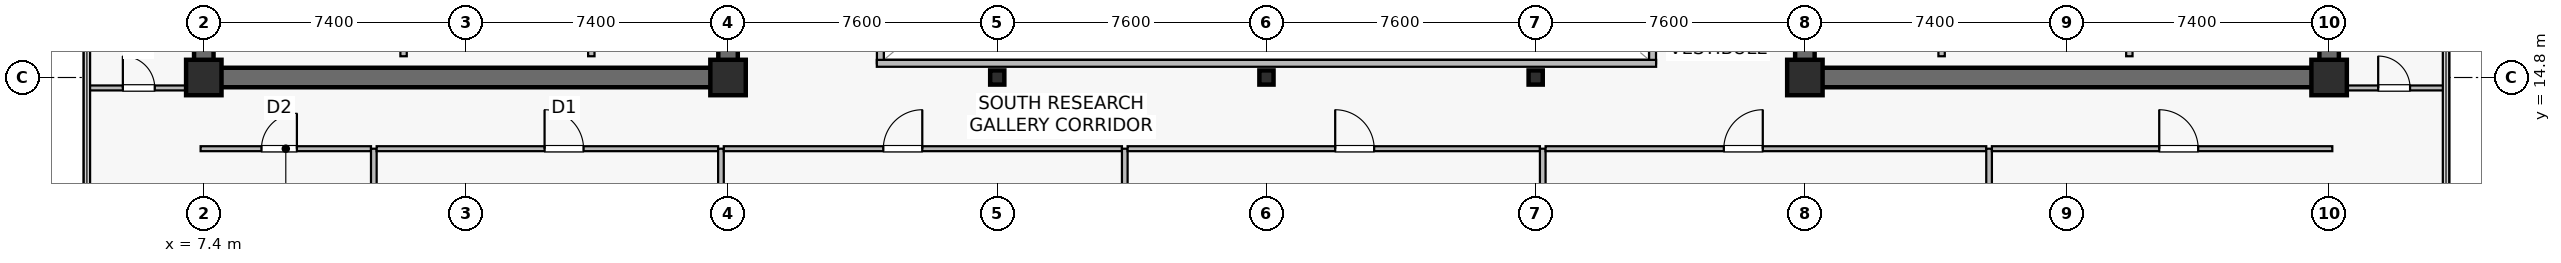
"""IFC4 building model, lengths in metres.
Left out: names, types, materials, properties, quantities, classifications, styles, units other than length and angle.
Written with IfcOpenShell. Run it as: python <this file> out.ifc"""

import sys

from ifc_helpers import new_model, si_unit, direction, frame, frame_2d, origin, origin_2d, place, context, subcontext, project, spatial, rectangle, hollow_rectangle, extrude, source, transform, mapped, element, fill, save


model = new_model("IFC4")
c1 = context("Model", 3, precision=1e-05, world=origin(), true_north=direction((0.0, 1.0)))
c2 = subcontext(c1, "Body", "Model", "MODEL_VIEW")
j1 = project(units=[si_unit("LENGTHUNIT", "METRE"), si_unit("PLANEANGLEUNIT", "RADIAN")], contexts=[c1])
p1 = place(None, origin())
s1 = spatial("IfcSite", under=j1, at=p1, CompositionType="ELEMENT")
p2 = place(p1, origin())
s2 = spatial("IfcBuilding", under=s1, at=p2, CompositionType="ELEMENT")
p3 = place(p2, frame((0.0, 0.0, 205.5)))
s3 = spatial("IfcBuildingStorey", under=s2, at=p3, CompositionType="ELEMENT", Elevation=205.5)
p4 = place(p3, frame((7.125, 14.8, 0.0), z_axis=(0.0, 0.0, 1.0), x_axis=(1.0, 0.0, 0.0)))
e1 = element("IfcWall", 1, at=p4, inside=s3, PredefinedType="SHEAR", context=c2, shape_type="SweptSolid", body=[
    extrude(rectangle(XDim=15.35, YDim=0.55, at=frame_2d((7.675, 0.0))), origin(), (0.0, 0.0, 1.0), 3.8),
])
p5 = place(p3, frame((7.4, 15.075, 0.0), z_axis=(0.0, 0.0, 1.0), x_axis=(0.0, 1.0, 0.0)))
e2 = element("IfcWall", 2, at=p5, inside=s3, PredefinedType="SHEAR", context=c2, shape_type="SweptSolid", body=[
    extrude(rectangle(XDim=18.45, YDim=0.55, at=frame_2d((9.225, 0.0))), origin(), (0.0, 0.0, 1.0), 3.8),
])
p6 = place(p3, frame((22.2, 15.075, 0.0), z_axis=(0.0, 0.0, 1.0), x_axis=(0.0, 1.0, 0.0)))
e3 = element("IfcWall", 3, at=p6, inside=s3, PredefinedType="SHEAR", context=c2, shape_type="SweptSolid", body=[
    extrude(rectangle(XDim=18.45, YDim=0.55, at=frame_2d((9.225, 0.0))), origin(), (0.0, 0.0, 1.0), 3.8),
])
p7 = place(p6, frame((3.475, 0.0, 0.0)))
e4 = element("IfcOpeningElement", 4, at=p7, cuts=e3, PredefinedType="OPENING", context=c2, shape_type="SweptSolid", body=[
    extrude(rectangle(XDim=1.42, YDim=2.2, at=frame_2d((0.71, 1.1))), frame((0.0, 0.285, 0.0), z_axis=(0.0, -1.0, 0.0), x_axis=(1.0, 0.0, 0.0)), (0.0, 0.0, 1.0), 0.57),
])
p8 = place(p3, frame((52.325, 14.8, 0.0), z_axis=(0.0, 0.0, 1.0), x_axis=(1.0, 0.0, 0.0)))
e5 = element("IfcWall", 5, at=p8, inside=s3, PredefinedType="SHEAR", context=c2, shape_type="SweptSolid", body=[
    extrude(rectangle(XDim=15.35, YDim=0.55, at=frame_2d((7.675, 0.0))), origin(), (0.0, 0.0, 1.0), 3.8),
])
p9 = place(p3, frame((52.6, 15.075, 0.0), z_axis=(0.0, 0.0, 1.0), x_axis=(0.0, 1.0, 0.0)))
e6 = element("IfcWall", 6, at=p9, inside=s3, PredefinedType="SHEAR", context=c2, shape_type="SweptSolid", body=[
    extrude(rectangle(XDim=18.45, YDim=0.55, at=frame_2d((9.225, 0.0))), origin(), (0.0, 0.0, 1.0), 3.8),
])
p10 = place(p9, frame((3.475, 0.0, 0.0)))
e7 = element("IfcOpeningElement", 7, at=p10, cuts=e6, PredefinedType="OPENING", context=c2, shape_type="SweptSolid", body=[
    extrude(rectangle(XDim=1.42, YDim=2.2, at=frame_2d((0.71, 1.1))), frame((0.0, 0.285, 0.0), z_axis=(0.0, -1.0, 0.0), x_axis=(1.0, 0.0, 0.0)), (0.0, 0.0, 1.0), 0.57),
])
p11 = place(p3, frame((67.4, 15.075, 0.0), z_axis=(0.0, 0.0, 1.0), x_axis=(0.0, 1.0, 0.0)))
e8 = element("IfcWall", 8, at=p11, inside=s3, PredefinedType="SHEAR", context=c2, shape_type="SweptSolid", body=[
    extrude(rectangle(XDim=18.45, YDim=0.55, at=frame_2d((9.225, 0.0))), origin(), (0.0, 0.0, 1.0), 3.8),
])
m1 = source(origin(), c2, "Body", "SweptSolid", [
    extrude(rectangle(XDim=1.0, YDim=1.0, at=origin_2d()), origin(), (0.0, 0.0, 1.0), 4.1),
])
for number, where, z_axis, x_axis in (
    (9, (7.4, 14.8, 0.0), (0.0, 0.0, 1.0), (1.0, 0.0, 0.0)),
    (10, (22.2, 14.8, 0.0), (0.0, 0.0, 1.0), (1.0, 0.0, 0.0)),
    (11, (52.6, 14.8, 0.0), (0.0, 0.0, 1.0), (1.0, 0.0, 0.0)),
    (12, (67.4, 14.8, 0.0), (0.0, 0.0, 1.0), (1.0, 0.0, 0.0)),
):
    element("IfcColumn", number, at=place(p3, frame(where, z_axis=z_axis, x_axis=x_axis)), inside=s3, PredefinedType="COLUMN", context=c2, shape_type="MappedRepresentation", body=[
        mapped(m1, transform((0.0, 0.0, 0.0), scale=1.0)),
    ])
m2 = source(origin(), c2, "Body", "SweptSolid", [
    extrude(hollow_rectangle(XDim=0.4, YDim=0.4, WallThickness=0.019, at=origin_2d()), origin(), (0.0, 0.0, 1.0), 4.1),
])
for number, where, z_axis, x_axis in (
    (13, (29.8, 14.8, 0.0), (0.0, 0.0, 1.0), (1.0, 0.0, 0.0)),
    (14, (37.4, 14.8, 0.0), (0.0, 0.0, 1.0), (1.0, 0.0, 0.0)),
    (15, (45.0, 14.8, 0.0), (0.0, 0.0, 1.0), (1.0, 0.0, 0.0)),
):
    element("IfcColumn", number, at=place(p3, frame(where, z_axis=z_axis, x_axis=x_axis)), inside=s3, PredefinedType="COLUMN", context=c2, shape_type="MappedRepresentation", body=[
        mapped(m2, transform((0.0, 0.0, 0.0), scale=1.0)),
    ])
for number, where, z_axis, x_axis in (
    (16, (13.04, 15.4, 0.0), (0.0, 0.0, 1.0), (0.0, 1.0, 0.0)),
    (17, (18.34, 15.4, 0.0), (0.0, 0.0, 1.0), (0.0, 1.0, 0.0)),
    (18, (61.76, 15.4, 0.0), (0.0, 0.0, 1.0), (0.0, 1.0, 0.0)),
    (19, (56.46, 15.4, 0.0), (0.0, 0.0, 1.0), (0.0, 1.0, 0.0)),
):
    element("IfcWall", number, at=place(p3, frame(where, z_axis=z_axis, x_axis=x_axis)), inside=s3, PredefinedType="SOLIDWALL", context=c2, shape_type="SweptSolid", body=[
        extrude(rectangle(XDim=2.4, YDim=0.18, at=frame_2d((1.2, 0.0))), origin(), (0.0, 0.0, 1.0), 3.8),
    ])
p12 = place(p3, frame((26.5, 15.2, 0.0), z_axis=(0.0, 0.0, 1.0), x_axis=(0.0, 1.0, 0.0)))
e20 = element("IfcWall", 20, at=p12, inside=s3, PredefinedType="SOLIDWALL", context=c2, shape_type="SweptSolid", body=[
    extrude(rectangle(XDim=18.2, YDim=0.195, at=frame_2d((9.1, 0.0))), origin(), (0.0, 0.0, 1.0), 3.8),
])
p13 = place(p12, frame((1.8, 0.0, 0.9)))
e21 = element("IfcOpeningElement", 21, at=p13, cuts=e20, PredefinedType="OPENING", context=c2, shape_type="SweptSolid", body=[
    extrude(rectangle(XDim=1.2, YDim=1.35, at=frame_2d((0.6, 0.675))), frame((0.0, 0.107, 0.0), z_axis=(0.0, -1.0, 0.0), x_axis=(1.0, 0.0, 0.0)), (0.0, 0.0, 1.0), 0.215),
])
p14 = place(p12, frame((13.2, 0.0, 0.9)))
e22 = element("IfcOpeningElement", 22, at=p14, cuts=e20, PredefinedType="OPENING", context=c2, shape_type="SweptSolid", body=[
    extrude(rectangle(XDim=1.2, YDim=1.35, at=frame_2d((0.6, 0.675))), frame((0.0, 0.107, 0.0), z_axis=(0.0, -1.0, 0.0), x_axis=(1.0, 0.0, 0.0)), (0.0, 0.0, 1.0), 0.215),
])
p15 = place(p3, frame((48.3, 15.2, 0.0), z_axis=(0.0, 0.0, 1.0), x_axis=(0.0, 1.0, 0.0)))
e23 = element("IfcWall", 23, at=p15, inside=s3, PredefinedType="SOLIDWALL", context=c2, shape_type="SweptSolid", body=[
    extrude(rectangle(XDim=18.2, YDim=0.195, at=frame_2d((9.1, 0.0))), origin(), (0.0, 0.0, 1.0), 3.8),
])
p16 = place(p15, frame((1.8, 0.0, 0.9)))
e24 = element("IfcOpeningElement", 24, at=p16, cuts=e23, PredefinedType="OPENING", context=c2, shape_type="SweptSolid", body=[
    extrude(rectangle(XDim=1.2, YDim=1.35, at=frame_2d((0.6, 0.675))), frame((0.0, 0.107, 0.0), z_axis=(0.0, -1.0, 0.0), x_axis=(1.0, 0.0, 0.0)), (0.0, 0.0, 1.0), 0.215),
])
p17 = place(p15, frame((13.2, 0.0, 0.9)))
e25 = element("IfcOpeningElement", 25, at=p17, cuts=e23, PredefinedType="OPENING", context=c2, shape_type="SweptSolid", body=[
    extrude(rectangle(XDim=1.2, YDim=1.35, at=frame_2d((0.6, 0.675))), frame((0.0, 0.107, 0.0), z_axis=(0.0, -1.0, 0.0), x_axis=(1.0, 0.0, 0.0)), (0.0, 0.0, 1.0), 0.215),
])
p18 = place(p3, frame((26.4, 15.2, 0.0), z_axis=(0.0, 0.0, 1.0), x_axis=(1.0, 0.0, 0.0)))
e26 = element("IfcWall", 26, at=p18, inside=s3, PredefinedType="SOLIDWALL", context=c2, shape_type="SweptSolid", body=[
    extrude(rectangle(XDim=22.0, YDim=0.195, at=frame_2d((11.0, 0.0))), origin(), (0.0, 0.0, 1.0), 3.8),
])
p19 = place(p3, frame((7.31, 12.79, 0.0), z_axis=(0.0, 0.0, 1.0), x_axis=(1.0, 0.0, 0.0)))
e27 = element("IfcWall", 27, at=p19, inside=s3, PredefinedType="PARTITIONING", context=c2, shape_type="SweptSolid", body=[
    extrude(rectangle(XDim=4.81, YDim=0.14, at=frame_2d((2.405, 0.0))), origin(), (0.0, 0.0, 1.0), 3.335),
])
p20 = place(p19, frame((1.719, 0.0, 0.0)))
e28 = element("IfcOpeningElement", 28, at=p20, cuts=e27, PredefinedType="OPENING", context=c2, shape_type="SweptSolid", body=[
    extrude(rectangle(XDim=1.0, YDim=2.15, at=frame_2d((0.5, 1.075))), frame((0.0, 0.08, 0.0), z_axis=(0.0, -1.0, 0.0), x_axis=(1.0, 0.0, 0.0)), (0.0, 0.0, 1.0), 0.16),
])
p21 = place(p3, frame((12.2, 2.71, 0.0), z_axis=(0.0, 0.0, 1.0), x_axis=(0.0, 1.0, 0.0)))
e29 = element("IfcWall", 29, at=p21, inside=s3, PredefinedType="PARTITIONING", context=c2, shape_type="SweptSolid", body=[
    extrude(rectangle(XDim=10.08, YDim=0.16, at=frame_2d((5.04, 0.0))), origin(), (0.0, 0.0, 1.0), 3.135),
])
p22 = place(p3, frame((12.28, 12.79, 0.0), z_axis=(0.0, 0.0, 1.0), x_axis=(1.0, 0.0, 0.0)))
e30 = element("IfcWall", 30, at=p22, inside=s3, PredefinedType="PARTITIONING", context=c2, shape_type="SweptSolid", body=[
    extrude(rectangle(XDim=9.64, YDim=0.14, at=frame_2d((4.82, 0.0))), origin(), (0.0, 0.0, 1.0), 3.197),
])
p23 = place(p22, frame((4.74, 0.0, 0.0)))
e31 = element("IfcOpeningElement", 31, at=p23, cuts=e30, PredefinedType="OPENING", context=c2, shape_type="SweptSolid", body=[
    extrude(rectangle(XDim=1.1, YDim=2.18, at=frame_2d((0.55, 1.09))), frame((0.0, 0.08, 0.0), z_axis=(0.0, -1.0, 0.0), x_axis=(1.0, 0.0, 0.0)), (0.0, 0.0, 1.0), 0.16),
])
p24 = place(p3, frame((22.0, 2.71, 0.0), z_axis=(0.0, 0.0, 1.0), x_axis=(0.0, 1.0, 0.0)))
e32 = element("IfcWall", 32, at=p24, inside=s3, PredefinedType="PARTITIONING", context=c2, shape_type="SweptSolid", body=[
    extrude(rectangle(XDim=10.08, YDim=0.16, at=frame_2d((5.04, 0.0))), origin(), (0.0, 0.0, 1.0), 3.135),
])
p25 = place(p3, frame((22.08, 12.79, 0.0), z_axis=(0.0, 0.0, 1.0), x_axis=(1.0, 0.0, 0.0)))
e33 = element("IfcWall", 33, at=p25, inside=s3, PredefinedType="PARTITIONING", context=c2, shape_type="SweptSolid", body=[
    extrude(rectangle(XDim=11.24, YDim=0.14, at=frame_2d((5.62, 0.0))), origin(), (0.0, 0.0, 1.0), 3.197),
])
p26 = place(p25, frame((4.504, 0.0, 0.0)))
e34 = element("IfcOpeningElement", 34, at=p26, cuts=e33, PredefinedType="OPENING", context=c2, shape_type="SweptSolid", body=[
    extrude(rectangle(XDim=1.1, YDim=2.18, at=frame_2d((0.55, 1.09))), frame((0.0, 0.08, 0.0), z_axis=(0.0, -1.0, 0.0), x_axis=(1.0, 0.0, 0.0)), (0.0, 0.0, 1.0), 0.16),
])
p27 = place(p3, frame((33.4, 3.91, 0.0), z_axis=(0.0, 0.0, 1.0), x_axis=(0.0, 1.0, 0.0)))
e35 = element("IfcWall", 35, at=p27, inside=s3, PredefinedType="PARTITIONING", context=c2, shape_type="SweptSolid", body=[
    extrude(rectangle(XDim=8.88, YDim=0.16, at=frame_2d((4.44, 0.0))), origin(), (0.0, 0.0, 1.0), 3.135),
])
p28 = place(p3, frame((33.48, 12.79, 0.0), z_axis=(0.0, 0.0, 1.0), x_axis=(1.0, 0.0, 0.0)))
e36 = element("IfcWall", 36, at=p28, inside=s3, PredefinedType="PARTITIONING", context=c2, shape_type="SweptSolid", body=[
    extrude(rectangle(XDim=11.64, YDim=0.14, at=frame_2d((5.82, 0.0))), origin(), (0.0, 0.0, 1.0), 3.197),
])
p29 = place(p28, frame((5.86, 0.0, 0.0)))
e37 = element("IfcOpeningElement", 37, at=p29, cuts=e36, PredefinedType="OPENING", context=c2, shape_type="SweptSolid", body=[
    extrude(rectangle(XDim=1.1, YDim=2.18, at=frame_2d((0.55, 1.09))), frame((0.0, 0.08, 0.0), z_axis=(0.0, -1.0, 0.0), x_axis=(1.0, 0.0, 0.0)), (0.0, 0.0, 1.0), 0.16),
])
p30 = place(p3, frame((45.2, 3.91, 0.0), z_axis=(0.0, 0.0, 1.0), x_axis=(0.0, 1.0, 0.0)))
e38 = element("IfcWall", 38, at=p30, inside=s3, PredefinedType="PARTITIONING", context=c2, shape_type="SweptSolid", body=[
    extrude(rectangle(XDim=8.88, YDim=0.16, at=frame_2d((4.44, 0.0))), origin(), (0.0, 0.0, 1.0), 3.135),
])
p31 = place(p3, frame((45.28, 12.79, 0.0), z_axis=(0.0, 0.0, 1.0), x_axis=(1.0, 0.0, 0.0)))
e39 = element("IfcWall", 39, at=p31, inside=s3, PredefinedType="PARTITIONING", context=c2, shape_type="SweptSolid", body=[
    extrude(rectangle(XDim=12.44, YDim=0.14, at=frame_2d((6.22, 0.0))), origin(), (0.0, 0.0, 1.0), 3.197),
])
p32 = place(p31, frame((5.031, 0.0, 0.0)))
e40 = element("IfcOpeningElement", 40, at=p32, cuts=e39, PredefinedType="OPENING", context=c2, shape_type="SweptSolid", body=[
    extrude(rectangle(XDim=1.1, YDim=2.18, at=frame_2d((0.55, 1.09))), frame((0.0, 0.08, 0.0), z_axis=(0.0, -1.0, 0.0), x_axis=(1.0, 0.0, 0.0)), (0.0, 0.0, 1.0), 0.16),
])
p33 = place(p3, frame((57.8, 2.71, 0.0), z_axis=(0.0, 0.0, 1.0), x_axis=(0.0, 1.0, 0.0)))
e41 = element("IfcWall", 41, at=p33, inside=s3, PredefinedType="PARTITIONING", context=c2, shape_type="SweptSolid", body=[
    extrude(rectangle(XDim=10.08, YDim=0.16, at=frame_2d((5.04, 0.0))), origin(), (0.0, 0.0, 1.0), 3.135),
])
p34 = place(p3, frame((57.88, 12.79, 0.0), z_axis=(0.0, 0.0, 1.0), x_axis=(1.0, 0.0, 0.0)))
e42 = element("IfcWall", 42, at=p34, inside=s3, PredefinedType="PARTITIONING", context=c2, shape_type="SweptSolid", body=[
    extrude(rectangle(XDim=9.61, YDim=0.14, at=frame_2d((4.805, 0.0))), origin(), (0.0, 0.0, 1.0), 3.197),
])
p35 = place(p34, frame((4.724, 0.0, 0.0)))
e43 = element("IfcOpeningElement", 43, at=p35, cuts=e42, PredefinedType="OPENING", context=c2, shape_type="SweptSolid", body=[
    extrude(rectangle(XDim=1.1, YDim=2.18, at=frame_2d((0.55, 1.09))), frame((0.0, 0.08, 0.0), z_axis=(0.0, -1.0, 0.0), x_axis=(1.0, 0.0, 0.0)), (0.0, 0.0, 1.0), 0.16),
])
p36 = place(p3, frame((4.11, 14.505, 0.0), z_axis=(0.0, 0.0, 1.0), x_axis=(1.0, 0.0, 0.0)))
e44 = element("IfcWall", 44, at=p36, inside=s3, PredefinedType="PARTITIONING", context=c2, shape_type="SweptSolid", body=[
    extrude(rectangle(XDim=2.91, YDim=0.14, at=frame_2d((1.455, 0.0))), origin(), (0.0, 0.0, 1.0), 3.8),
])
p37 = place(p36, frame((1.005, 0.0, 0.0)))
e45 = element("IfcOpeningElement", 45, at=p37, cuts=e44, PredefinedType="OPENING", context=c2, shape_type="SweptSolid", body=[
    extrude(rectangle(XDim=0.9, YDim=2.1, at=frame_2d((0.45, 1.05))), frame((0.0, 0.08, 0.0), z_axis=(0.0, -1.0, 0.0), x_axis=(1.0, 0.0, 0.0)), (0.0, 0.0, 1.0), 0.16),
])
p38 = place(p3, frame((67.78, 14.505, 0.0), z_axis=(0.0, 0.0, 1.0), x_axis=(1.0, 0.0, 0.0)))
e46 = element("IfcWall", 46, at=p38, inside=s3, PredefinedType="PARTITIONING", context=c2, shape_type="SweptSolid", body=[
    extrude(rectangle(XDim=2.91, YDim=0.14, at=frame_2d((1.455, 0.0))), origin(), (0.0, 0.0, 1.0), 3.8),
])
p39 = place(p38, frame((1.005, 0.0, 0.0)))
e47 = element("IfcOpeningElement", 47, at=p39, cuts=e46, PredefinedType="OPENING", context=c2, shape_type="SweptSolid", body=[
    extrude(rectangle(XDim=0.9, YDim=2.1, at=frame_2d((0.45, 1.05))), frame((0.0, 0.08, 0.0), z_axis=(0.0, -1.0, 0.0), x_axis=(1.0, 0.0, 0.0)), (0.0, 0.0, 1.0), 0.16),
])
m3 = source(origin(), c2, "Body", "SweptSolid", [
    extrude(rectangle(XDim=1.0, YDim=2.15, at=frame_2d((0.5, 1.075))), frame((0.0, 0.025, 0.0), z_axis=(0.0, -1.0, 0.0), x_axis=(1.0, 0.0, 0.0)), (0.0, 0.0, 1.0), 0.05),
])
p40 = place(p20, origin())
e48 = element("IfcDoor", 48, at=p40, inside=s3, OperationType="SINGLE_SWING_RIGHT", PredefinedType="DOOR", context=c2, shape_type="MappedRepresentation", body=[
    mapped(m3, transform((0.0, 0.0, 0.0), scale=1.0)),
])
fill(e28, e48)
m4 = source(origin(), c2, "Body", "SweptSolid", [
    extrude(rectangle(XDim=1.1, YDim=2.18, at=frame_2d((0.55, 1.09))), frame((0.0, 0.025, 0.0), z_axis=(0.0, -1.0, 0.0), x_axis=(1.0, 0.0, 0.0)), (0.0, 0.0, 1.0), 0.05),
])
p41 = place(p23, origin())
e49 = element("IfcDoor", 49, at=p41, inside=s3, OperationType="SINGLE_SWING_LEFT", PredefinedType="DOOR", context=c2, shape_type="MappedRepresentation", body=[
    mapped(m4, transform((0.0, 0.0, 0.0), scale=1.0)),
])
fill(e31, e49)
p42 = place(p26, origin())
e50 = element("IfcDoor", 50, at=p42, inside=s3, OperationType="SINGLE_SWING_RIGHT", PredefinedType="DOOR", context=c2, shape_type="MappedRepresentation", body=[
    mapped(m4, transform((0.0, 0.0, 0.0), scale=1.0)),
])
fill(e34, e50)
p43 = place(p29, origin())
e51 = element("IfcDoor", 51, at=p43, inside=s3, OperationType="SINGLE_SWING_LEFT", PredefinedType="DOOR", context=c2, shape_type="MappedRepresentation", body=[
    mapped(m4, transform((0.0, 0.0, 0.0), scale=1.0)),
])
fill(e37, e51)
p44 = place(p32, origin())
e52 = element("IfcDoor", 52, at=p44, inside=s3, OperationType="SINGLE_SWING_RIGHT", PredefinedType="DOOR", context=c2, shape_type="MappedRepresentation", body=[
    mapped(m4, transform((0.0, 0.0, 0.0), scale=1.0)),
])
fill(e40, e52)
p45 = place(p35, origin())
e53 = element("IfcDoor", 53, at=p45, inside=s3, OperationType="SINGLE_SWING_LEFT", PredefinedType="DOOR", context=c2, shape_type="MappedRepresentation", body=[
    mapped(m4, transform((0.0, 0.0, 0.0), scale=1.0)),
])
fill(e43, e53)
m5 = source(origin(), c2, "Body", "SweptSolid", [
    extrude(rectangle(XDim=0.9, YDim=2.1, at=frame_2d((0.45, 1.05))), frame((0.0, 0.025, 0.0), z_axis=(0.0, -1.0, 0.0), x_axis=(1.0, 0.0, 0.0)), (0.0, 0.0, 1.0), 0.05),
])
p46 = place(p37, origin())
e54 = element("IfcDoor", 54, at=p46, inside=s3, OperationType="SINGLE_SWING_LEFT", PredefinedType="DOOR", context=c2, shape_type="MappedRepresentation", body=[
    mapped(m5, transform((0.0, 0.0, 0.0), scale=1.0)),
])
fill(e45, e54)
p47 = place(p39, origin())
e55 = element("IfcDoor", 55, at=p47, inside=s3, OperationType="SINGLE_SWING_LEFT", PredefinedType="DOOR", context=c2, shape_type="MappedRepresentation", body=[
    mapped(m5, transform((0.0, 0.0, 0.0), scale=1.0)),
])
fill(e47, e55)
save(model, sys.argv[1])
